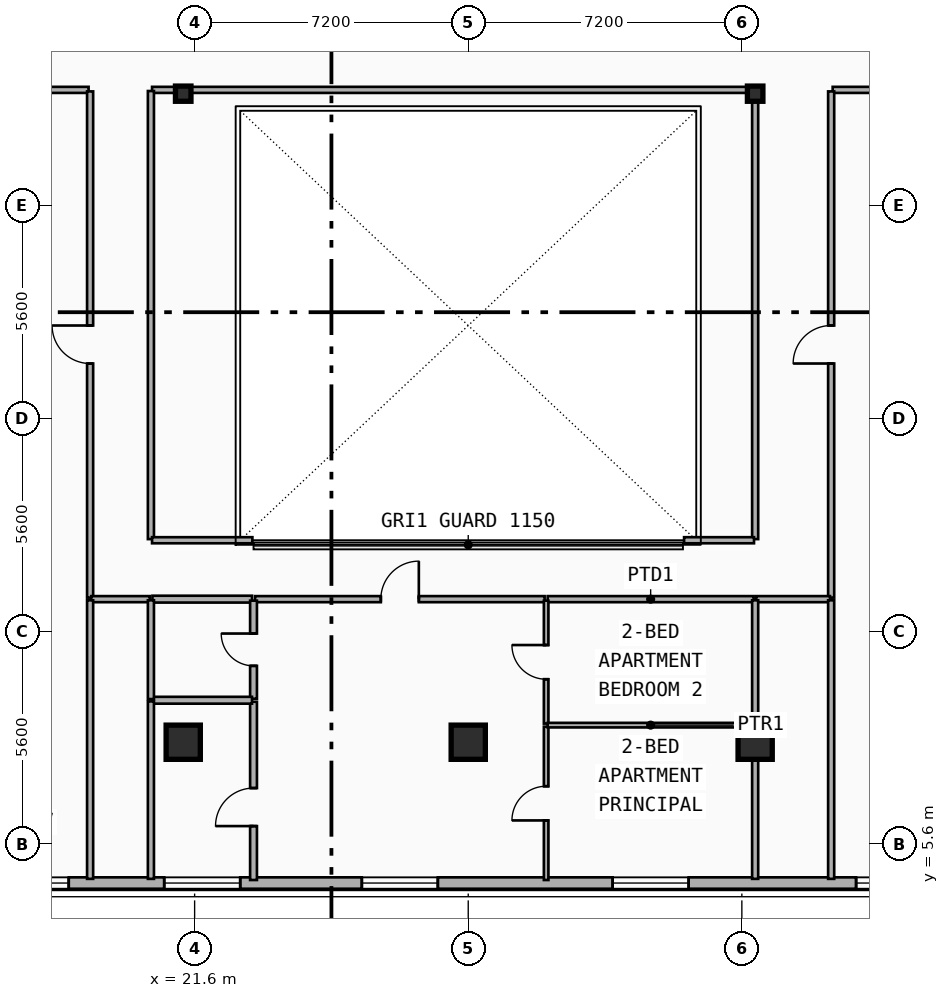
"""IFC4 building model, lengths in metres.
Left out: names, types, materials, properties, quantities, classifications, styles, units other than length and angle.
Written with IfcOpenShell. Run it as: python <this file> out.ifc"""

import sys

from ifc_helpers import new_model, si_unit, direction, frame, frame_2d, origin, origin_2d, place, context, subcontext, project, spatial, rectangle, i_section, extrude, element, fill, save


model = new_model("IFC4")
c1 = context("Model", 3, precision=1e-05, world=origin(), true_north=direction((0.0, 1.0)))
c2 = subcontext(c1, "Body", "Model", "MODEL_VIEW")
j1 = project(units=[si_unit("LENGTHUNIT", "METRE"), si_unit("PLANEANGLEUNIT", "RADIAN")], contexts=[c1])
p1 = place(None, origin())
s1 = spatial("IfcSite", under=j1, at=p1, CompositionType="ELEMENT")
p2 = place(p1, origin())
s2 = spatial("IfcBuilding", under=s1, at=p2, CompositionType="ELEMENT")
p3 = place(p2, frame((0.0, 0.0, 196.8)))
s3 = spatial("IfcBuildingStorey", under=s2, at=p3, CompositionType="ELEMENT", Elevation=196.8)
for number, where, z_axis, x_axis in (
    (1, (21.3, 25.35, 0.0), (0.0, 0.0, 1.0), (1.0, 0.0, 0.0)),
    (2, (36.35, 25.35, 0.0), (0.0, 0.0, 1.0), (1.0, 0.0, 0.0)),
):
    element("IfcColumn", number, at=place(p3, frame(where, z_axis=z_axis, x_axis=x_axis)), inside=s3, PredefinedType="COLUMN", context=c2, shape_type="SweptSolid", body=[
        extrude(i_section(OverallWidth=0.408, OverallDepth=0.4, WebThickness=0.025, FlangeThickness=0.039, FilletRadius=0.015, at=origin_2d()), origin(), (0.0, 0.0, 1.0), 3.6),
    ])
for number, where, z_axis, x_axis in (
    (3, (21.3, 8.394, 0.0), (0.0, -0.09, 0.996), (1.0, 0.0, 0.0)),
    (4, (28.8, 8.394, 0.0), (0.0, -0.09, 0.996), (1.0, 0.0, 0.0)),
    (5, (36.35, 8.394, 0.0), (0.0, -0.09, 0.996), (1.0, 0.0, 0.0)),
):
    element("IfcColumn", number, at=place(p3, frame(where, z_axis=z_axis, x_axis=x_axis)), inside=s3, PredefinedType="COLUMN", context=c2, shape_type="SweptSolid", body=[
        extrude(rectangle(XDim=0.9, YDim=0.9, at=origin_2d()), origin(), (0.0, 0.0, 1.0), 3.615),
    ])
p4 = place(p3, frame((48.0, 4.58, 0.0), z_axis=(0.0, 0.0, 1.0), x_axis=(-1.0, 0.0, 0.0)))
e6 = element("IfcWall", 6, at=p4, inside=s3, PredefinedType="SOLIDWALL", context=c2, shape_type="SweptSolid", body=[
    extrude(rectangle(XDim=38.4, YDim=0.3, at=frame_2d((19.2, 0.0))), origin(), (0.0, 0.0, 1.0), 3.34),
])
p5 = place(p4, frame((36.19, 0.0, 0.8)))
e7 = element("IfcOpeningElement", 7, at=p5, cuts=e6, PredefinedType="OPENING", context=c2, shape_type="SweptSolid", body=[
    extrude(rectangle(XDim=1.8, YDim=1.8, at=frame_2d((0.9, 0.9))), frame((0.0, 0.16, 0.0), z_axis=(0.0, -1.0, 0.0), x_axis=(1.0, 0.0, 0.0)), (0.0, 0.0, 1.0), 0.32),
])
p6 = place(p4, frame((29.712, 0.0, 0.7)))
e8 = element("IfcOpeningElement", 8, at=p6, cuts=e6, PredefinedType="OPENING", context=c2, shape_type="SweptSolid", body=[
    extrude(rectangle(XDim=2.0, YDim=2.2, at=frame_2d((1.0, 1.1))), frame((0.0, 0.16, 0.0), z_axis=(0.0, -1.0, 0.0), x_axis=(1.0, 0.0, 0.0)), (0.0, 0.0, 1.0), 0.32),
])
p7 = place(p4, frame((33.038, 0.0, 0.7)))
e9 = element("IfcOpeningElement", 9, at=p7, cuts=e6, PredefinedType="OPENING", context=c2, shape_type="SweptSolid", body=[
    extrude(rectangle(XDim=2.0, YDim=2.2, at=frame_2d((1.0, 1.1))), frame((0.0, 0.16, 0.0), z_axis=(0.0, -1.0, 0.0), x_axis=(1.0, 0.0, 0.0)), (0.0, 0.0, 1.0), 0.32),
])
p8 = place(p4, frame((20.0, 0.0, 0.7)))
e10 = element("IfcOpeningElement", 10, at=p8, cuts=e6, PredefinedType="OPENING", context=c2, shape_type="SweptSolid", body=[
    extrude(rectangle(XDim=2.0, YDim=2.2, at=frame_2d((1.0, 1.1))), frame((0.0, 0.16, 0.0), z_axis=(0.0, -1.0, 0.0), x_axis=(1.0, 0.0, 0.0)), (0.0, 0.0, 1.0), 0.32),
])
p9 = place(p4, frame((25.2, 0.0, 0.7)))
e11 = element("IfcOpeningElement", 11, at=p9, cuts=e6, PredefinedType="OPENING", context=c2, shape_type="SweptSolid", body=[
    extrude(rectangle(XDim=2.0, YDim=2.2, at=frame_2d((1.0, 1.1))), frame((0.0, 0.16, 0.0), z_axis=(0.0, -1.0, 0.0), x_axis=(1.0, 0.0, 0.0)), (0.0, 0.0, 1.0), 0.32),
])
p10 = place(p4, frame((13.4, 0.0, 0.7)))
e12 = element("IfcOpeningElement", 12, at=p10, cuts=e6, PredefinedType="OPENING", context=c2, shape_type="SweptSolid", body=[
    extrude(rectangle(XDim=2.0, YDim=2.2, at=frame_2d((1.0, 1.1))), frame((0.0, 0.16, 0.0), z_axis=(0.0, -1.0, 0.0), x_axis=(1.0, 0.0, 0.0)), (0.0, 0.0, 1.0), 0.32),
])
p11 = place(p4, frame((6.993, 0.0, 0.7)))
e13 = element("IfcOpeningElement", 13, at=p11, cuts=e6, PredefinedType="OPENING", context=c2, shape_type="SweptSolid", body=[
    extrude(rectangle(XDim=2.0, YDim=2.2, at=frame_2d((1.0, 1.1))), frame((0.0, 0.16, 0.0), z_axis=(0.0, -1.0, 0.0), x_axis=(1.0, 0.0, 0.0)), (0.0, 0.0, 1.0), 0.32),
])
p12 = place(p4, frame((3.469, 0.0, 0.7)))
e14 = element("IfcOpeningElement", 14, at=p12, cuts=e6, PredefinedType="OPENING", context=c2, shape_type="SweptSolid", body=[
    extrude(rectangle(XDim=2.0, YDim=2.2, at=frame_2d((1.0, 1.1))), frame((0.0, 0.16, 0.0), z_axis=(0.0, -1.0, 0.0), x_axis=(1.0, 0.0, 0.0)), (0.0, 0.0, 1.0), 0.32),
])
p13 = place(p4, frame((0.41, 0.0, 0.8)))
e15 = element("IfcOpeningElement", 15, at=p13, cuts=e6, PredefinedType="OPENING", context=c2, shape_type="SweptSolid", body=[
    extrude(rectangle(XDim=1.8, YDim=1.8, at=frame_2d((0.9, 0.9))), frame((0.0, 0.16, 0.0), z_axis=(0.0, -1.0, 0.0), x_axis=(1.0, 0.0, 0.0)), (0.0, 0.0, 1.0), 0.32),
])
p14 = place(p3, frame((15.765, 25.45, 0.0), z_axis=(0.0, 0.0, 1.0), x_axis=(1.0, 0.0, 0.0)))
e16 = element("IfcWall", 16, at=p14, inside=s3, PredefinedType="PARTITIONING", context=c2, shape_type="SweptSolid", body=[
    extrude(rectangle(XDim=3.045, YDim=0.16, at=frame_2d((1.522, 0.0))), origin(), (0.0, 0.0, 1.0), 3.34),
])
p15 = place(p14, frame((1.022, 0.0, 0.0)))
e17 = element("IfcOpeningElement", 17, at=p15, cuts=e16, PredefinedType="OPENING", context=c2, shape_type="SweptSolid", body=[
    extrude(rectangle(XDim=1.0, YDim=2.15, at=frame_2d((0.5, 1.075))), frame((0.0, 0.09, 0.0), z_axis=(0.0, -1.0, 0.0), x_axis=(1.0, 0.0, 0.0)), (0.0, 0.0, 1.0), 0.18),
])
p16 = place(p3, frame((38.39, 25.45, 0.0), z_axis=(0.0, 0.0, 1.0), x_axis=(1.0, 0.0, 0.0)))
e18 = element("IfcWall", 18, at=p16, inside=s3, PredefinedType="PARTITIONING", context=c2, shape_type="SweptSolid", body=[
    extrude(rectangle(XDim=3.233, YDim=0.16, at=frame_2d((1.617, 0.0))), origin(), (0.0, 0.0, 1.0), 3.34),
])
p17 = place(p16, frame((1.116, 0.0, 0.0)))
e19 = element("IfcOpeningElement", 19, at=p17, cuts=e18, PredefinedType="OPENING", context=c2, shape_type="SweptSolid", body=[
    extrude(rectangle(XDim=1.0, YDim=2.15, at=frame_2d((0.5, 1.075))), frame((0.0, 0.09, 0.0), z_axis=(0.0, -1.0, 0.0), x_axis=(1.0, 0.0, 0.0)), (0.0, 0.0, 1.0), 0.18),
])
p18 = place(p3, frame((18.85, 12.09, 0.0), z_axis=(0.0, 0.0, 1.0), x_axis=(0.0, 1.0, 0.0)))
e20 = element("IfcWall", 20, at=p18, inside=s3, PredefinedType="PARTITIONING", context=c2, shape_type="SweptSolid", body=[
    extrude(rectangle(XDim=13.32, YDim=0.16, at=frame_2d((6.66, 0.0))), origin(), (0.0, 0.0, 1.0), 2.87),
])
p19 = place(p18, frame((6.16, 0.0, 0.0)))
e21 = element("IfcOpeningElement", 21, at=p19, cuts=e20, PredefinedType="OPENING", context=c2, shape_type="SweptSolid", body=[
    extrude(rectangle(XDim=1.0, YDim=2.15, at=frame_2d((0.5, 1.075))), frame((0.0, 0.09, 0.0), z_axis=(0.0, -1.0, 0.0), x_axis=(1.0, 0.0, 0.0)), (0.0, 0.0, 1.0), 0.18),
])
p20 = place(p3, frame((38.35, 12.09, 0.0), z_axis=(0.0, 0.0, 1.0), x_axis=(0.0, 1.0, 0.0)))
e22 = element("IfcWall", 22, at=p20, inside=s3, PredefinedType="PARTITIONING", context=c2, shape_type="SweptSolid", body=[
    extrude(rectangle(XDim=13.32, YDim=0.16, at=frame_2d((6.66, 0.0))), origin(), (0.0, 0.0, 1.0), 2.87),
])
p21 = place(p20, frame((6.16, 0.0, 0.0)))
e23 = element("IfcOpeningElement", 23, at=p21, cuts=e22, PredefinedType="OPENING", context=c2, shape_type="SweptSolid", body=[
    extrude(rectangle(XDim=1.0, YDim=2.15, at=frame_2d((0.5, 1.075))), frame((0.0, 0.09, 0.0), z_axis=(0.0, -1.0, 0.0), x_axis=(1.0, 0.0, 0.0)), (0.0, 0.0, 1.0), 0.18),
])
p22 = place(p3, frame((23.19, 12.05, 0.0), z_axis=(0.0, 0.0, 1.0), x_axis=(1.0, 0.0, 0.0)))
e24 = element("IfcWall", 24, at=p22, inside=s3, PredefinedType="PARTITIONING", context=c2, shape_type="SweptSolid", body=[
    extrude(rectangle(XDim=7.62, YDim=0.16, at=frame_2d((3.81, 0.0))), origin(), (0.0, 0.0, 1.0), 2.42),
])
p23 = place(p22, frame((3.31, 0.0, 0.0)))
e25 = element("IfcOpeningElement", 25, at=p23, cuts=e24, PredefinedType="OPENING", context=c2, shape_type="SweptSolid", body=[
    extrude(rectangle(XDim=1.0, YDim=2.15, at=frame_2d((0.5, 1.075))), frame((0.0, 0.09, 0.0), z_axis=(0.0, -1.0, 0.0), x_axis=(1.0, 0.0, 0.0)), (0.0, 0.0, 1.0), 0.18),
])
p24 = place(p3, frame((20.49, 12.05, 0.0), z_axis=(0.0, 0.0, 1.0), x_axis=(1.0, 0.0, 0.0)))
e26 = element("IfcWall", 26, at=p24, inside=s3, PredefinedType="PLUMBINGWALL", context=c2, shape_type="SweptSolid", body=[
    extrude(rectangle(XDim=2.62, YDim=0.18, at=frame_2d((1.31, 0.0))), origin(), (0.0, 0.0, 1.0), 2.42),
])
p25 = place(p3, frame((30.89, 12.05, 0.0), z_axis=(0.0, 0.0, 1.0), x_axis=(1.0, 0.0, 0.0)))
e27 = element("IfcWall", 27, at=p25, inside=s3, PredefinedType="PARTITIONING", context=c2, shape_type="SweptSolid", body=[
    extrude(rectangle(XDim=5.42, YDim=0.16, at=frame_2d((2.71, 0.0))), origin(), (0.0, 0.0, 1.0), 2.42),
])
p26 = place(p3, frame((23.15, 4.66, 0.0), z_axis=(0.0, 0.0, 1.0), x_axis=(0.0, 1.0, 0.0)))
e28 = element("IfcWall", 28, at=p26, inside=s3, PredefinedType="PLUMBINGWALL", context=c2, shape_type="SweptSolid", body=[
    extrude(rectangle(XDim=4.69, YDim=0.18, at=frame_2d((2.345, 0.0))), origin(), (0.0, 0.0, 1.0), 3.0),
])
p27 = place(p26, frame((1.419, 0.0, 0.0)))
e29 = element("IfcOpeningElement", 29, at=p27, cuts=e28, PredefinedType="OPENING", context=c2, shape_type="SweptSolid", body=[
    extrude(rectangle(XDim=1.0, YDim=2.15, at=frame_2d((0.5, 1.075))), frame((0.0, 0.1, 0.0), z_axis=(0.0, -1.0, 0.0), x_axis=(1.0, 0.0, 0.0)), (0.0, 0.0, 1.0), 0.2),
])
p28 = place(p3, frame((23.15, 9.43, 0.0), z_axis=(0.0, 0.0, 1.0), x_axis=(0.0, 1.0, 0.0)))
e30 = element("IfcWall", 30, at=p28, inside=s3, PredefinedType="PLUMBINGWALL", context=c2, shape_type="SweptSolid", body=[
    extrude(rectangle(XDim=2.58, YDim=0.18, at=frame_2d((1.29, 0.0))), origin(), (0.0, 0.0, 1.0), 2.96),
])
p29 = place(p28, frame((0.865, 0.0, 0.0)))
e31 = element("IfcOpeningElement", 31, at=p29, cuts=e30, PredefinedType="OPENING", context=c2, shape_type="SweptSolid", body=[
    extrude(rectangle(XDim=0.85, YDim=2.1, at=frame_2d((0.425, 1.05))), frame((0.0, 0.1, 0.0), z_axis=(0.0, -1.0, 0.0), x_axis=(1.0, 0.0, 0.0)), (0.0, 0.0, 1.0), 0.2),
])
p30 = place(p3, frame((30.85, 4.66, 0.0), z_axis=(0.0, 0.0, 1.0), x_axis=(0.0, 1.0, 0.0)))
e32 = element("IfcWall", 32, at=p30, inside=s3, PredefinedType="PARTITIONING", context=c2, shape_type="SweptSolid", body=[
    extrude(rectangle(XDim=4.035, YDim=0.12, at=frame_2d((2.018, 0.0))), origin(), (0.0, 0.0, 1.0), 3.0),
])
p31 = place(p30, frame((1.567, 0.0, 0.0)))
e33 = element("IfcOpeningElement", 33, at=p31, cuts=e32, PredefinedType="OPENING", context=c2, shape_type="SweptSolid", body=[
    extrude(rectangle(XDim=0.9, YDim=2.1, at=frame_2d((0.45, 1.05))), frame((0.0, 0.07, 0.0), z_axis=(0.0, -1.0, 0.0), x_axis=(1.0, 0.0, 0.0)), (0.0, 0.0, 1.0), 0.14),
])
p32 = place(p3, frame((30.85, 8.775, 0.0), z_axis=(0.0, 0.0, 1.0), x_axis=(0.0, 1.0, 0.0)))
e34 = element("IfcWall", 34, at=p32, inside=s3, PredefinedType="PARTITIONING", context=c2, shape_type="SweptSolid", body=[
    extrude(rectangle(XDim=3.235, YDim=0.12, at=frame_2d((1.618, 0.0))), origin(), (0.0, 0.0, 1.0), 2.96),
])
p33 = place(p32, frame((1.167, 0.0, 0.0)))
e35 = element("IfcOpeningElement", 35, at=p33, cuts=e34, PredefinedType="OPENING", context=c2, shape_type="SweptSolid", body=[
    extrude(rectangle(XDim=0.9, YDim=2.1, at=frame_2d((0.45, 1.05))), frame((0.0, 0.07, 0.0), z_axis=(0.0, -1.0, 0.0), x_axis=(1.0, 0.0, 0.0)), (0.0, 0.0, 1.0), 0.14),
])
p34 = place(p3, frame((20.49, 9.39, 0.0), z_axis=(0.0, 0.0, 1.0), x_axis=(1.0, 0.0, 0.0)))
e36 = element("IfcWall", 36, at=p34, inside=s3, PredefinedType="PLUMBINGWALL", context=c2, shape_type="SweptSolid", body=[
    extrude(rectangle(XDim=2.62, YDim=0.18, at=frame_2d((1.31, 0.0))), origin(), (0.0, 0.0, 1.0), 2.42),
])
p35 = place(p3, frame((30.89, 8.735, 0.0), z_axis=(0.0, 0.0, 1.0), x_axis=(1.0, 0.0, 0.0)))
e37 = element("IfcWall", 37, at=p35, inside=s3, PredefinedType="PARTITIONING", context=c2, shape_type="SweptSolid", body=[
    extrude(rectangle(XDim=5.42, YDim=0.12, at=frame_2d((2.71, 0.0))), origin(), (0.0, 0.0, 1.0), 2.42),
])
p36 = place(p3, frame((20.48, 25.45, 0.0), z_axis=(0.0, 0.0, 1.0), x_axis=(1.0, 0.0, 0.0)))
e38 = element("IfcWall", 38, at=p36, inside=s3, PredefinedType="PARTITIONING", context=c2, shape_type="SweptSolid", body=[
    extrude(rectangle(XDim=15.84, YDim=0.16, at=frame_2d((7.92, 0.0))), origin(), (0.0, 0.0, 1.0), 2.42),
])
p37 = place(p3, frame((18.88, 12.05, 0.0), z_axis=(0.0, 0.0, 1.0), x_axis=(1.0, 0.0, 0.0)))
e39 = element("IfcWall", 39, at=p37, inside=s3, PredefinedType="PARTITIONING", context=c2, shape_type="SweptSolid", body=[
    extrude(rectangle(XDim=1.54, YDim=0.16, at=frame_2d((0.77, 0.0))), origin(), (0.0, 0.0, 1.0), 2.87),
])
p38 = place(p3, frame((20.45, 13.63, 0.0), z_axis=(0.0, 0.0, 1.0), x_axis=(0.0, 1.0, 0.0)))
e40 = element("IfcWall", 40, at=p38, inside=s3, PredefinedType="PARTITIONING", context=c2, shape_type="SweptSolid", body=[
    extrude(rectangle(XDim=11.79, YDim=0.16, at=frame_2d((5.895, 0.0))), origin(), (0.0, 0.0, 1.0), 2.87),
])
p39 = place(p3, frame((36.38, 12.05, 0.0), z_axis=(0.0, 0.0, 1.0), x_axis=(1.0, 0.0, 0.0)))
e41 = element("IfcWall", 41, at=p39, inside=s3, PredefinedType="PARTITIONING", context=c2, shape_type="SweptSolid", body=[
    extrude(rectangle(XDim=1.94, YDim=0.16, at=frame_2d((0.97, 0.0))), origin(), (0.0, 0.0, 1.0), 2.42),
])
p40 = place(p3, frame((36.35, 13.63, 0.0), z_axis=(0.0, 0.0, 1.0), x_axis=(0.0, 1.0, 0.0)))
e42 = element("IfcWall", 42, at=p40, inside=s3, PredefinedType="PARTITIONING", context=c2, shape_type="SweptSolid", body=[
    extrude(rectangle(XDim=11.79, YDim=0.16, at=frame_2d((5.895, 0.0))), origin(), (0.0, 0.0, 1.0), 2.42),
])
p41 = place(p3, frame((20.48, 13.6, 0.0), z_axis=(0.0, 0.0, 1.0), x_axis=(1.0, 0.0, 0.0)))
e43 = element("IfcWall", 43, at=p41, inside=s3, PredefinedType="PARTITIONING", context=c2, shape_type="SweptSolid", body=[
    extrude(rectangle(XDim=2.64, YDim=0.16, at=frame_2d((1.32, 0.0))), origin(), (0.0, 0.0, 1.0), 2.42),
])
p42 = place(p3, frame((34.48, 13.6, 0.0), z_axis=(0.0, 0.0, 1.0), x_axis=(1.0, 0.0, 0.0)))
e44 = element("IfcWall", 44, at=p42, inside=s3, PredefinedType="PARTITIONING", context=c2, shape_type="SweptSolid", body=[
    extrude(rectangle(XDim=1.84, YDim=0.16, at=frame_2d((0.92, 0.0))), origin(), (0.0, 0.0, 1.0), 2.42),
])
p43 = place(p3, frame((18.85, 4.69, 0.0), z_axis=(0.0, 0.0, 1.0), x_axis=(0.0, 1.0, 0.0)))
e45 = element("IfcWall", 45, at=p43, inside=s3, PredefinedType="PARTITIONING", context=c2, shape_type="SweptSolid", body=[
    extrude(rectangle(XDim=7.33, YDim=0.16, at=frame_2d((3.665, 0.0))), origin(), (0.0, 0.0, 1.0), 2.87),
])
p44 = place(p3, frame((20.45, 4.69, 0.0), z_axis=(0.0, 0.0, 1.0), x_axis=(0.0, 1.0, 0.0)))
e46 = element("IfcWall", 46, at=p44, inside=s3, PredefinedType="PARTITIONING", context=c2, shape_type="SweptSolid", body=[
    extrude(rectangle(XDim=4.67, YDim=0.16, at=frame_2d((2.335, 0.0))), origin(), (0.0, 0.0, 1.0), 3.0),
])
p45 = place(p3, frame((20.45, 9.42, 0.0), z_axis=(0.0, 0.0, 1.0), x_axis=(0.0, 1.0, 0.0)))
e47 = element("IfcWall", 47, at=p45, inside=s3, PredefinedType="PARTITIONING", context=c2, shape_type="SweptSolid", body=[
    extrude(rectangle(XDim=2.6, YDim=0.16, at=frame_2d((1.3, 0.0))), origin(), (0.0, 0.0, 1.0), 2.87),
])
p46 = place(p3, frame((36.35, 4.69, 0.0), z_axis=(0.0, 0.0, 1.0), x_axis=(0.0, 1.0, 0.0)))
e48 = element("IfcWall", 48, at=p46, inside=s3, PredefinedType="PARTITIONING", context=c2, shape_type="SweptSolid", body=[
    extrude(rectangle(XDim=4.015, YDim=0.16, at=frame_2d((2.008, 0.0))), origin(), (0.0, 0.0, 1.0), 2.42),
])
p47 = place(p3, frame((36.35, 8.765, 0.0), z_axis=(0.0, 0.0, 1.0), x_axis=(0.0, 1.0, 0.0)))
e49 = element("IfcWall", 49, at=p47, inside=s3, PredefinedType="PARTITIONING", context=c2, shape_type="SweptSolid", body=[
    extrude(rectangle(XDim=3.255, YDim=0.16, at=frame_2d((1.627, 0.0))), origin(), (0.0, 0.0, 1.0), 2.42),
])
p48 = place(p3, frame((38.35, 4.69, 0.0), z_axis=(0.0, 0.0, 1.0), x_axis=(0.0, 1.0, 0.0)))
e50 = element("IfcWall", 50, at=p48, inside=s3, PredefinedType="PARTITIONING", context=c2, shape_type="SweptSolid", body=[
    extrude(rectangle(XDim=7.33, YDim=0.16, at=frame_2d((3.665, 0.0))), origin(), (0.0, 0.0, 1.0), 2.87),
])
p49 = place(p6, origin())
e51 = element("IfcWindow", 51, at=p49, inside=s3, PartitioningType="SINGLE_PANEL", PredefinedType="WINDOW", context=c2, shape_type="SweptSolid", body=[
    extrude(rectangle(XDim=2.0, YDim=2.2, at=frame_2d((1.0, 1.1))), frame((0.0, 0.03, 0.0), z_axis=(0.0, -1.0, 0.0), x_axis=(1.0, 0.0, 0.0)), (0.0, 0.0, 1.0), 0.06),
])
fill(e8, e51)
p50 = place(p8, origin())
e52 = element("IfcWindow", 52, at=p50, inside=s3, PartitioningType="SINGLE_PANEL", PredefinedType="WINDOW", context=c2, shape_type="SweptSolid", body=[
    extrude(rectangle(XDim=2.0, YDim=2.2, at=frame_2d((1.0, 1.1))), frame((0.0, 0.03, 0.0), z_axis=(0.0, -1.0, 0.0), x_axis=(1.0, 0.0, 0.0)), (0.0, 0.0, 1.0), 0.06),
])
fill(e10, e52)
p51 = place(p9, origin())
e53 = element("IfcWindow", 53, at=p51, inside=s3, PartitioningType="SINGLE_PANEL", PredefinedType="WINDOW", context=c2, shape_type="SweptSolid", body=[
    extrude(rectangle(XDim=2.0, YDim=2.2, at=frame_2d((1.0, 1.1))), frame((0.0, 0.03, 0.0), z_axis=(0.0, -1.0, 0.0), x_axis=(1.0, 0.0, 0.0)), (0.0, 0.0, 1.0), 0.06),
])
fill(e11, e53)
p52 = place(p10, origin())
e54 = element("IfcWindow", 54, at=p52, inside=s3, PartitioningType="SINGLE_PANEL", PredefinedType="WINDOW", context=c2, shape_type="SweptSolid", body=[
    extrude(rectangle(XDim=2.0, YDim=2.2, at=frame_2d((1.0, 1.1))), frame((0.0, 0.03, 0.0), z_axis=(0.0, -1.0, 0.0), x_axis=(1.0, 0.0, 0.0)), (0.0, 0.0, 1.0), 0.06),
])
fill(e12, e54)
p53 = place(p11, origin())
e55 = element("IfcWindow", 55, at=p53, inside=s3, PartitioningType="SINGLE_PANEL", PredefinedType="WINDOW", context=c2, shape_type="SweptSolid", body=[
    extrude(rectangle(XDim=2.0, YDim=2.2, at=frame_2d((1.0, 1.1))), frame((0.0, 0.03, 0.0), z_axis=(0.0, -1.0, 0.0), x_axis=(1.0, 0.0, 0.0)), (0.0, 0.0, 1.0), 0.06),
])
fill(e13, e55)
p54 = place(p19, origin())
e56 = element("IfcDoor", 56, at=p54, inside=s3, OperationType="SINGLE_SWING_RIGHT", PredefinedType="DOOR", context=c2, shape_type="SweptSolid", body=[
    extrude(rectangle(XDim=1.0, YDim=2.15, at=frame_2d((0.5, 1.075))), frame((0.0, 0.025, 0.0), z_axis=(0.0, -1.0, 0.0), x_axis=(1.0, 0.0, 0.0)), (0.0, 0.0, 1.0), 0.05),
])
fill(e21, e56)
p55 = place(p21, origin())
e57 = element("IfcDoor", 57, at=p55, inside=s3, OperationType="SINGLE_SWING_LEFT", PredefinedType="DOOR", context=c2, shape_type="SweptSolid", body=[
    extrude(rectangle(XDim=1.0, YDim=2.15, at=frame_2d((0.5, 1.075))), frame((0.0, 0.025, 0.0), z_axis=(0.0, -1.0, 0.0), x_axis=(1.0, 0.0, 0.0)), (0.0, 0.0, 1.0), 0.05),
])
fill(e23, e57)
p56 = place(p23, origin())
e58 = element("IfcDoor", 58, at=p56, inside=s3, OperationType="SINGLE_SWING_RIGHT", PredefinedType="DOOR", context=c2, shape_type="SweptSolid", body=[
    extrude(rectangle(XDim=1.0, YDim=2.15, at=frame_2d((0.5, 1.075))), frame((0.0, 0.025, 0.0), z_axis=(0.0, -1.0, 0.0), x_axis=(1.0, 0.0, 0.0)), (0.0, 0.0, 1.0), 0.05),
])
fill(e25, e58)
p57 = place(p27, origin())
e59 = element("IfcDoor", 59, at=p57, inside=s3, OperationType="SINGLE_SWING_LEFT", PredefinedType="DOOR", context=c2, shape_type="SweptSolid", body=[
    extrude(rectangle(XDim=1.0, YDim=2.15, at=frame_2d((0.5, 1.075))), frame((0.0, 0.025, 0.0), z_axis=(0.0, -1.0, 0.0), x_axis=(1.0, 0.0, 0.0)), (0.0, 0.0, 1.0), 0.05),
])
fill(e29, e59)
p58 = place(p29, origin())
e60 = element("IfcDoor", 60, at=p58, inside=s3, OperationType="SINGLE_SWING_RIGHT", PredefinedType="DOOR", context=c2, shape_type="SweptSolid", body=[
    extrude(rectangle(XDim=0.85, YDim=2.1, at=frame_2d((0.425, 1.05))), frame((0.0, 0.025, 0.0), z_axis=(0.0, -1.0, 0.0), x_axis=(1.0, 0.0, 0.0)), (0.0, 0.0, 1.0), 0.05),
])
fill(e31, e60)
p59 = place(p31, origin())
e61 = element("IfcDoor", 61, at=p59, inside=s3, OperationType="SINGLE_SWING_LEFT", PredefinedType="DOOR", context=c2, shape_type="SweptSolid", body=[
    extrude(rectangle(XDim=0.9, YDim=2.1, at=frame_2d((0.45, 1.05))), frame((0.0, 0.025, 0.0), z_axis=(0.0, -1.0, 0.0), x_axis=(1.0, 0.0, 0.0)), (0.0, 0.0, 1.0), 0.05),
])
fill(e33, e61)
p60 = place(p33, origin())
e62 = element("IfcDoor", 62, at=p60, inside=s3, OperationType="SINGLE_SWING_RIGHT", PredefinedType="DOOR", context=c2, shape_type="SweptSolid", body=[
    extrude(rectangle(XDim=0.9, YDim=2.1, at=frame_2d((0.45, 1.05))), frame((0.0, 0.025, 0.0), z_axis=(0.0, -1.0, 0.0), x_axis=(1.0, 0.0, 0.0)), (0.0, 0.0, 1.0), 0.05),
])
fill(e35, e62)
save(model, sys.argv[1])
